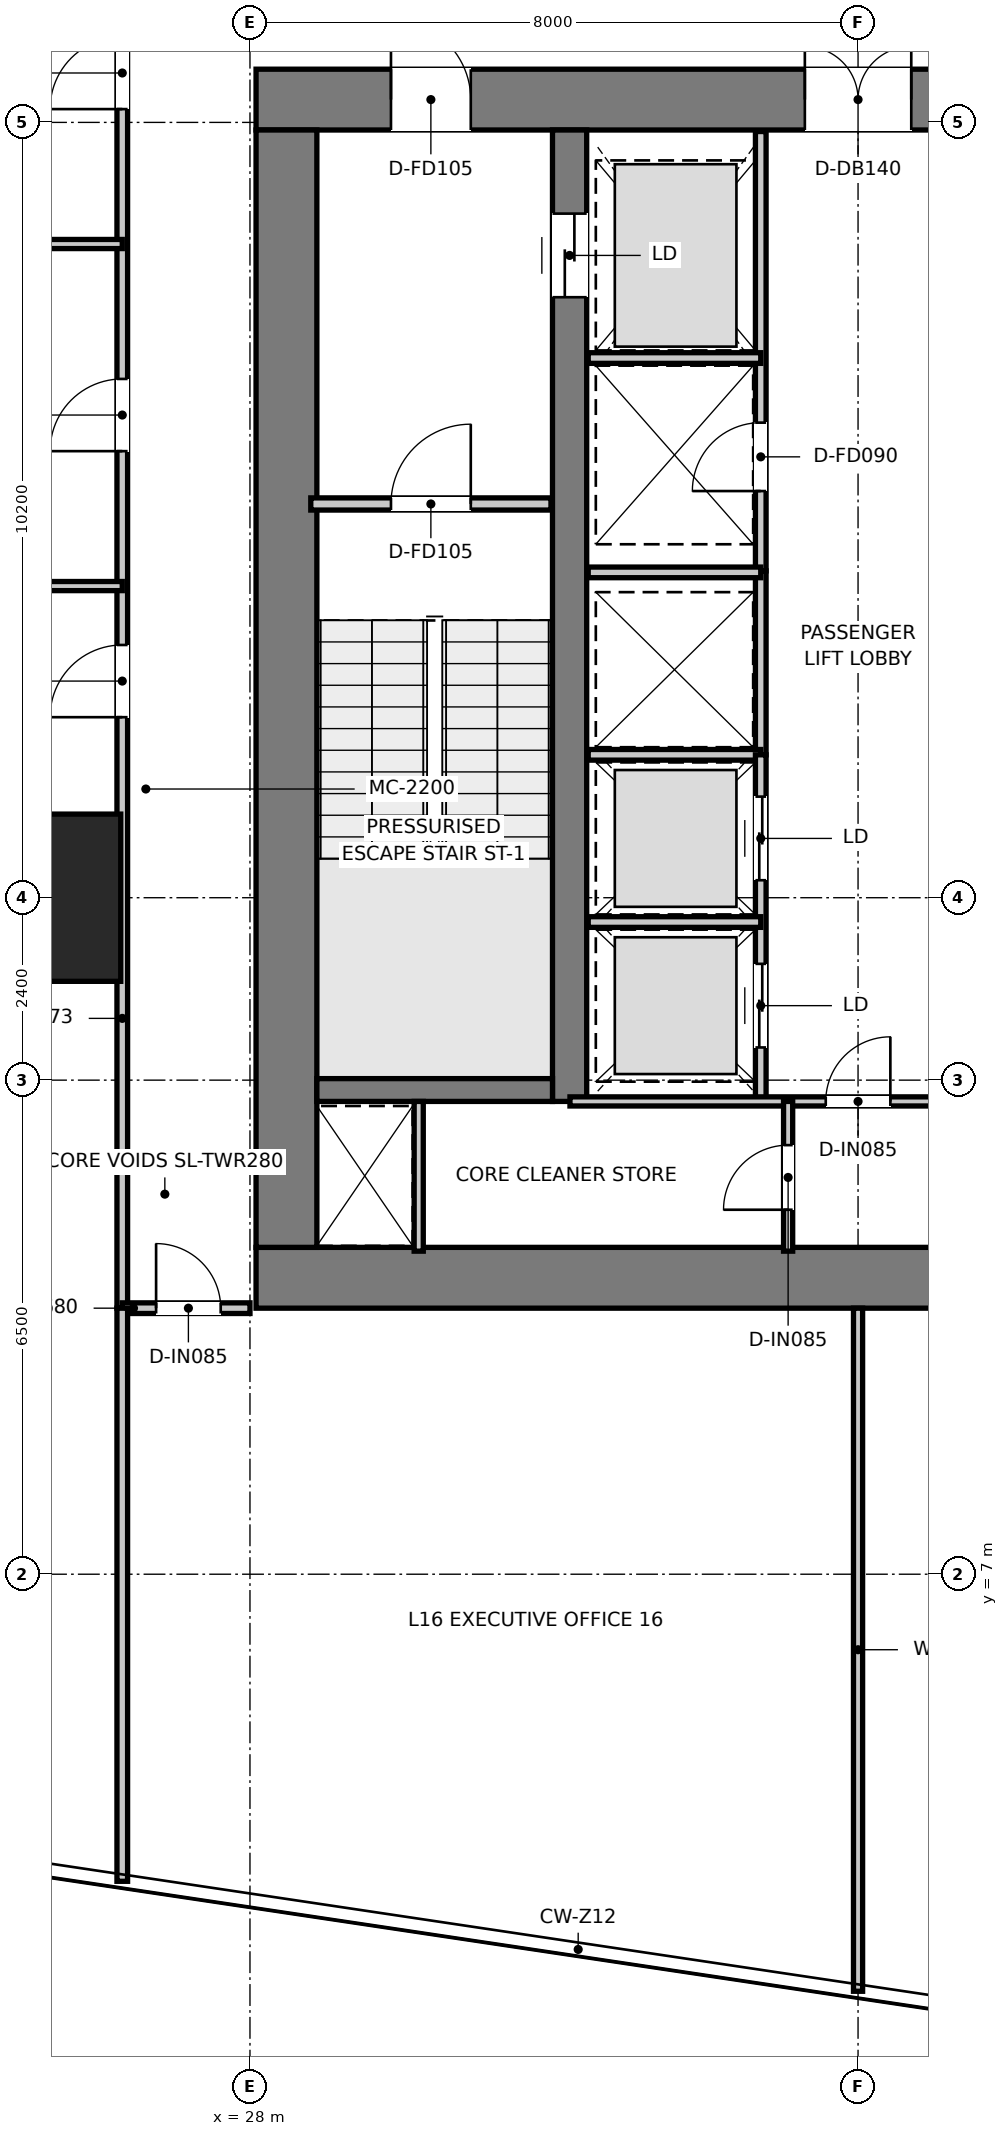
"""IFC4 building model, lengths in metres.
Left out: names, types, materials, properties, quantities, classifications, styles, units other than length and angle.
Written with IfcOpenShell. Run it as: python <this file> out.ifc"""

import sys

from ifc_helpers import new_model, si_unit, direction, frame, frame_2d, origin, origin_2d, place, context, subcontext, project, spatial, rectangle, extrude, source, transform, mapped, element, fill, save


model = new_model("IFC4")
c1 = context("Model", 3, precision=1e-05, world=origin(), true_north=direction((0.0, 1.0)))
c2 = subcontext(c1, "Body", "Model", "MODEL_VIEW")
j1 = project(units=[si_unit("LENGTHUNIT", "METRE"), si_unit("PLANEANGLEUNIT", "RADIAN")], contexts=[c1])
p1 = place(None, origin())
s1 = spatial("IfcSite", under=j1, at=p1, CompositionType="ELEMENT")
p2 = place(p1, origin())
s2 = spatial("IfcBuilding", under=s1, at=p2, CompositionType="ELEMENT")
p3 = place(p2, frame((0.0, 0.0, 68.45)))
s3 = spatial("IfcBuildingStorey", under=s2, at=p3, CompositionType="ELEMENT", Elevation=68.45)
p4 = place(p3, frame((28.08, 10.9, 0.0), z_axis=(0.0, 0.0, 1.0), x_axis=(1.0, 0.0, 0.0)))
e1 = element("IfcWall", 1, at=p4, inside=s3, PredefinedType="SHEAR", context=c2, shape_type="SweptSolid", body=[
    extrude(rectangle(XDim=15.84, YDim=0.8, at=frame_2d((7.92, 0.0))), origin(), (0.0, 0.0, 1.0), 3.95),
])
p5 = place(p3, frame((28.08, 26.4, 0.0), z_axis=(0.0, 0.0, 1.0), x_axis=(1.0, 0.0, 0.0)))
e2 = element("IfcWall", 2, at=p5, inside=s3, PredefinedType="SHEAR", context=c2, shape_type="SweptSolid", body=[
    extrude(rectangle(XDim=15.84, YDim=0.8, at=frame_2d((7.92, 0.0))), origin(), (0.0, 0.0, 1.0), 3.95),
])
p6 = place(p5, frame((7.22, 0.0, 0.0)))
e3 = element("IfcOpeningElement", 3, at=p6, cuts=e2, PredefinedType="OPENING", context=c2, shape_type="SweptSolid", body=[
    extrude(rectangle(XDim=1.4, YDim=2.2, at=frame_2d((0.7, 1.1))), frame((0.0, 0.41, 0.0), z_axis=(0.0, -1.0, 0.0), x_axis=(1.0, 0.0, 0.0)), (0.0, 0.0, 1.0), 0.82),
])
p7 = place(p5, frame((1.775, 0.0, 0.0)))
e4 = element("IfcOpeningElement", 4, at=p7, cuts=e2, PredefinedType="OPENING", context=c2, shape_type="SweptSolid", body=[
    extrude(rectangle(XDim=1.05, YDim=2.1, at=frame_2d((0.525, 1.05))), frame((0.0, 0.41, 0.0), z_axis=(0.0, -1.0, 0.0), x_axis=(1.0, 0.0, 0.0)), (0.0, 0.0, 1.0), 0.82),
])
p8 = place(p5, frame((13.015, 0.0, 0.0)))
e5 = element("IfcOpeningElement", 5, at=p8, cuts=e2, PredefinedType="OPENING", context=c2, shape_type="SweptSolid", body=[
    extrude(rectangle(XDim=1.05, YDim=2.1, at=frame_2d((0.525, 1.05))), frame((0.0, 0.41, 0.0), z_axis=(0.0, -1.0, 0.0), x_axis=(1.0, 0.0, 0.0)), (0.0, 0.0, 1.0), 0.82),
])
p9 = place(p3, frame((28.48, 11.3, 0.0), z_axis=(0.0, 0.0, 1.0), x_axis=(0.0, 1.0, 0.0)))
e6 = element("IfcWall", 6, at=p9, inside=s3, PredefinedType="SHEAR", context=c2, shape_type="SweptSolid", body=[
    extrude(rectangle(XDim=14.7, YDim=0.8, at=frame_2d((7.35, 0.0))), origin(), (0.0, 0.0, 1.0), 3.95),
])
p10 = place(p3, frame((32.205, 13.22, 0.0), z_axis=(0.0, 0.0, 1.0), x_axis=(0.0, 1.0, 0.0)))
e7 = element("IfcWall", 7, at=p10, inside=s3, PredefinedType="SHEAR", context=c2, shape_type="SweptSolid", body=[
    extrude(rectangle(XDim=12.78, YDim=0.45, at=frame_2d((6.39, 0.0))), origin(), (0.0, 0.0, 1.0), 3.95),
])
p11 = place(p10, frame((10.58, 0.0, 0.0)))
e8 = element("IfcOpeningElement", 8, at=p11, cuts=e7, PredefinedType="OPENING", context=c2, shape_type="SweptSolid", body=[
    extrude(rectangle(XDim=1.1, YDim=2.15, at=frame_2d((0.55, 1.075))), frame((0.0, 0.235, 0.0), z_axis=(0.0, -1.0, 0.0), x_axis=(1.0, 0.0, 0.0)), (0.0, 0.0, 1.0), 0.47),
])
p12 = place(p3, frame((28.88, 13.37, 0.0), z_axis=(0.0, 0.0, 1.0), x_axis=(1.0, 0.0, 0.0)))
e9 = element("IfcWall", 9, at=p12, inside=s3, PredefinedType="SHEAR", context=c2, shape_type="SweptSolid", body=[
    extrude(rectangle(XDim=3.1, YDim=0.3, at=frame_2d((1.55, 0.0))), origin(), (0.0, 0.0, 1.0), 3.95),
])
m1 = source(origin(), c2, "Body", "SweptSolid", [
    extrude(rectangle(XDim=2.2, YDim=2.2, at=origin_2d()), origin(), (0.0, 0.0, 1.0), 3.95),
])
p13 = place(p3, frame((25.2, 15.9, 0.0), z_axis=(0.0, 0.0, 1.0), x_axis=(1.0, 0.0, 0.0)))
e10 = element("IfcColumn", 10, at=p13, inside=s3, PredefinedType="USERDEFINED", context=c2, shape_type="MappedRepresentation", body=[
    mapped(m1, transform((0.0, 0.0, 0.0), x_axis=(1.0, 0.0, 0.0), y_axis=(0.0, 1.0, 0.0), z_axis=(0.0, 0.0, 1.0), scale=1.0)),
])
p14 = place(p3, frame((28.8, 21.08, 0.0), z_axis=(0.0, 0.0, 1.0), x_axis=(1.0, 0.0, 0.0)))
e11 = element("IfcWall", 11, at=p14, inside=s3, PredefinedType="PARTITIONING", context=c2, shape_type="SweptSolid", body=[
    extrude(rectangle(XDim=3.16, YDim=0.16, at=frame_2d((1.58, 0.0))), origin(), (0.0, 0.0, 1.0), 3.67),
])
p15 = place(p14, frame((1.055, 0.0, 0.0)))
e12 = element("IfcOpeningElement", 12, at=p15, cuts=e11, PredefinedType="OPENING", context=c2, shape_type="SweptSolid", body=[
    extrude(rectangle(XDim=1.05, YDim=2.1, at=frame_2d((0.525, 1.05))), frame((0.0, 0.09, 0.0), z_axis=(0.0, -1.0, 0.0), x_axis=(1.0, 0.0, 0.0)), (0.0, 0.0, 1.0), 0.18),
])
p16 = place(p3, frame((34.72, 20.2, 0.0), z_axis=(0.0, 0.0, 1.0), x_axis=(0.0, 1.0, 0.0)))
e13 = element("IfcWall", 13, at=p16, inside=s3, PredefinedType="PARTITIONING", context=c2, shape_type="SweptSolid", body=[
    extrude(rectangle(XDim=5.78, YDim=0.14, at=frame_2d((2.89, 0.0))), origin(), (0.0, 0.0, 1.0), 2.47),
])
p17 = place(p16, frame((1.05, 0.0, 0.0)))
e14 = element("IfcOpeningElement", 14, at=p17, cuts=e13, PredefinedType="OPENING", context=c2, shape_type="SweptSolid", body=[
    extrude(rectangle(XDim=0.9, YDim=2.1, at=frame_2d((0.45, 1.05))), frame((0.0, 0.08, 0.0), z_axis=(0.0, -1.0, 0.0), x_axis=(1.0, 0.0, 0.0)), (0.0, 0.0, 1.0), 0.16),
])
p18 = place(p3, frame((32.45, 23.0, 0.0), z_axis=(0.0, 0.0, 1.0), x_axis=(1.0, 0.0, 0.0)))
e15 = element("IfcWall", 15, at=p18, inside=s3, PredefinedType="PARTITIONING", context=c2, shape_type="SweptSolid", body=[
    extrude(rectangle(XDim=2.27, YDim=0.14, at=frame_2d((1.135, 0.0))), origin(), (0.0, 0.0, 1.0), 2.47),
])
p19 = place(p3, frame((34.72, 17.78, 0.0), z_axis=(0.0, 0.0, 1.0), x_axis=(0.0, 1.0, 0.0)))
e16 = element("IfcWall", 16, at=p19, inside=s3, PredefinedType="PARTITIONING", context=c2, shape_type="SweptSolid", body=[
    extrude(rectangle(XDim=2.42, YDim=0.14, at=frame_2d((1.21, 0.0))), origin(), (0.0, 0.0, 1.0), 3.67),
])
for number, where, z_axis, x_axis in (
    (17, (32.45, 17.78, 0.0), (0.0, 0.0, 1.0), (1.0, 0.0, 0.0)),
    (18, (32.45, 20.18, 0.0), (0.0, 0.0, 1.0), (1.0, 0.0, 0.0)),
):
    element("IfcWall", number, at=place(p3, frame(where, z_axis=z_axis, x_axis=x_axis)), inside=s3, PredefinedType="PARTITIONING", context=c2, shape_type="SweptSolid", body=[
        extrude(rectangle(XDim=2.27, YDim=0.14, at=frame_2d((1.135, 0.0))), origin(), (0.0, 0.0, 1.0), 3.67),
    ])
p20 = place(p3, frame((34.72, 13.22, 0.0), z_axis=(0.0, 0.0, 1.0), x_axis=(0.0, 1.0, 0.0)))
e19 = element("IfcWall", 19, at=p20, inside=s3, PredefinedType="PARTITIONING", context=c2, shape_type="SweptSolid", body=[
    extrude(rectangle(XDim=4.56, YDim=0.14, at=frame_2d((2.28, 0.0))), origin(), (0.0, 0.0, 1.0), 3.67),
])
p21 = place(p20, frame((0.71, 0.0, 0.0)))
e20 = element("IfcOpeningElement", 20, at=p21, cuts=e19, PredefinedType="OPENING", context=c2, shape_type="SweptSolid", body=[
    extrude(rectangle(XDim=1.1, YDim=2.15, at=frame_2d((0.55, 1.075))), frame((0.0, 0.08, 0.0), z_axis=(0.0, -1.0, 0.0), x_axis=(1.0, 0.0, 0.0)), (0.0, 0.0, 1.0), 0.16),
])
p22 = place(p20, frame((2.91, 0.0, 0.0)))
e21 = element("IfcOpeningElement", 21, at=p22, cuts=e19, PredefinedType="OPENING", context=c2, shape_type="SweptSolid", body=[
    extrude(rectangle(XDim=1.1, YDim=2.15, at=frame_2d((0.55, 1.075))), frame((0.0, 0.08, 0.0), z_axis=(0.0, -1.0, 0.0), x_axis=(1.0, 0.0, 0.0)), (0.0, 0.0, 1.0), 0.16),
])
p23 = place(p3, frame((32.45, 15.58, 0.0), z_axis=(0.0, 0.0, 1.0), x_axis=(1.0, 0.0, 0.0)))
e22 = element("IfcWall", 22, at=p23, inside=s3, PredefinedType="PARTITIONING", context=c2, shape_type="SweptSolid", body=[
    extrude(rectangle(XDim=2.27, YDim=0.14, at=frame_2d((1.135, 0.0))), origin(), (0.0, 0.0, 1.0), 3.67),
])
p24 = place(p3, frame((30.22, 11.25, 0.0), z_axis=(0.0, 0.0, 1.0), x_axis=(0.0, 1.0, 0.0)))
e23 = element("IfcWall", 23, at=p24, inside=s3, PredefinedType="PARTITIONING", context=c2, shape_type="SweptSolid", body=[
    extrude(rectangle(XDim=1.97, YDim=0.12, at=frame_2d((0.985, 0.0))), origin(), (0.0, 0.0, 1.0), 3.67),
])
p25 = place(p3, frame((32.21, 13.22, 0.0), z_axis=(0.0, 0.0, 1.0), x_axis=(1.0, 0.0, 0.0)))
e24 = element("IfcWall", 24, at=p25, inside=s3, PredefinedType="PARTITIONING", context=c2, shape_type="SweptSolid", body=[
    extrude(rectangle(XDim=7.58, YDim=0.12, at=frame_2d((3.79, 0.0))), origin(), (0.0, 0.0, 1.0), 3.67),
])
p26 = place(p25, frame((3.365, 0.0, 0.0)))
e25 = element("IfcOpeningElement", 25, at=p26, cuts=e24, PredefinedType="OPENING", context=c2, shape_type="SweptSolid", body=[
    extrude(rectangle(XDim=0.85, YDim=2.1, at=frame_2d((0.425, 1.05))), frame((0.0, 0.07, 0.0), z_axis=(0.0, -1.0, 0.0), x_axis=(1.0, 0.0, 0.0)), (0.0, 0.0, 1.0), 0.14),
])
p27 = place(p3, frame((35.08, 11.25, 0.0), z_axis=(0.0, 0.0, 1.0), x_axis=(0.0, 1.0, 0.0)))
e26 = element("IfcWall", 26, at=p27, inside=s3, PredefinedType="PARTITIONING", context=c2, shape_type="SweptSolid", body=[
    extrude(rectangle(XDim=1.97, YDim=0.12, at=frame_2d((0.985, 0.0))), origin(), (0.0, 0.0, 1.0), 3.67),
])
p28 = place(p27, frame((0.545, 0.0, 0.0)))
e27 = element("IfcOpeningElement", 27, at=p28, cuts=e26, PredefinedType="OPENING", context=c2, shape_type="SweptSolid", body=[
    extrude(rectangle(XDim=0.85, YDim=2.1, at=frame_2d((0.425, 1.05))), frame((0.0, 0.07, 0.0), z_axis=(0.0, -1.0, 0.0), x_axis=(1.0, 0.0, 0.0)), (0.0, 0.0, 1.0), 0.14),
])
p29 = place(p3, frame((26.32, 10.5, 0.0), z_axis=(0.0, 0.0, 1.0), x_axis=(0.0, 1.0, 0.0)))
e28 = element("IfcWall", 28, at=p29, inside=s3, PredefinedType="PARTITIONING", context=c2, shape_type="SweptSolid", body=[
    extrude(rectangle(XDim=25.62, YDim=0.14, at=frame_2d((12.81, 0.0))), origin(), (0.0, 0.0, 1.0), 2.97),
])
p30 = place(p29, frame((7.775, 0.0, 0.0)))
e29 = element("IfcOpeningElement", 29, at=p30, cuts=e28, PredefinedType="OPENING", context=c2, shape_type="SweptSolid", body=[
    extrude(rectangle(XDim=0.95, YDim=2.1, at=frame_2d((0.475, 1.05))), frame((0.0, 0.08, 0.0), z_axis=(0.0, -1.0, 0.0), x_axis=(1.0, 0.0, 0.0)), (0.0, 0.0, 1.0), 0.16),
])
p31 = place(p29, frame((11.275, 0.0, 0.0)))
e30 = element("IfcOpeningElement", 30, at=p31, cuts=e28, PredefinedType="OPENING", context=c2, shape_type="SweptSolid", body=[
    extrude(rectangle(XDim=0.95, YDim=2.1, at=frame_2d((0.475, 1.05))), frame((0.0, 0.08, 0.0), z_axis=(0.0, -1.0, 0.0), x_axis=(1.0, 0.0, 0.0)), (0.0, 0.0, 1.0), 0.16),
])
p32 = place(p29, frame((15.775, 0.0, 0.0)))
e31 = element("IfcOpeningElement", 31, at=p32, cuts=e28, PredefinedType="OPENING", context=c2, shape_type="SweptSolid", body=[
    extrude(rectangle(XDim=0.95, YDim=2.1, at=frame_2d((0.475, 1.05))), frame((0.0, 0.08, 0.0), z_axis=(0.0, -1.0, 0.0), x_axis=(1.0, 0.0, 0.0)), (0.0, 0.0, 1.0), 0.16),
])
p33 = place(p29, frame((20.125, 0.0, 0.0)))
e32 = element("IfcOpeningElement", 32, at=p33, cuts=e28, PredefinedType="OPENING", context=c2, shape_type="SweptSolid", body=[
    extrude(rectangle(XDim=0.95, YDim=2.1, at=frame_2d((0.475, 1.05))), frame((0.0, 0.08, 0.0), z_axis=(0.0, -1.0, 0.0), x_axis=(1.0, 0.0, 0.0)), (0.0, 0.0, 1.0), 0.16),
])
p34 = place(p29, frame((22.975, 0.0, 0.0)))
e33 = element("IfcOpeningElement", 33, at=p34, cuts=e28, PredefinedType="OPENING", context=c2, shape_type="SweptSolid", body=[
    extrude(rectangle(XDim=0.95, YDim=2.1, at=frame_2d((0.475, 1.05))), frame((0.0, 0.08, 0.0), z_axis=(0.0, -1.0, 0.0), x_axis=(1.0, 0.0, 0.0)), (0.0, 0.0, 1.0), 0.16),
])
p35 = place(p3, frame((26.32, 10.5, 0.0), z_axis=(0.0, 0.0, 1.0), x_axis=(1.0, 0.0, 0.0)))
e34 = element("IfcWall", 34, at=p35, inside=s3, PredefinedType="PARTITIONING", context=c2, shape_type="SweptSolid", body=[
    extrude(rectangle(XDim=1.68, YDim=0.14, at=frame_2d((0.84, 0.0))), origin(), (0.0, 0.0, 1.0), 3.67),
])
p36 = place(p35, frame((0.445, 0.0, 0.0)))
e35 = element("IfcOpeningElement", 35, at=p36, cuts=e34, PredefinedType="OPENING", context=c2, shape_type="SweptSolid", body=[
    extrude(rectangle(XDim=0.85, YDim=2.1, at=frame_2d((0.425, 1.05))), frame((0.0, 0.08, 0.0), z_axis=(0.0, -1.0, 0.0), x_axis=(1.0, 0.0, 0.0)), (0.0, 0.0, 1.0), 0.16),
])
p37 = place(p3, frame((26.32, 2.96, 0.0), z_axis=(0.0, 0.0, 1.0), x_axis=(0.0, 1.0, 0.0)))
e36 = element("IfcWall", 36, at=p37, inside=s3, PredefinedType="PARTITIONING", context=c2, shape_type="SweptSolid", body=[
    extrude(rectangle(XDim=7.54, YDim=0.14, at=frame_2d((3.77, 0.0))), origin(), (0.0, 0.0, 1.0), 3.67),
])
p38 = place(p3, frame((9.812, 20.0, 0.0), z_axis=(0.0, 0.0, 1.0), x_axis=(1.0, 0.0, 0.0)))
e37 = element("IfcWall", 37, at=p38, inside=s3, PredefinedType="PARTITIONING", context=c2, shape_type="SweptSolid", body=[
    extrude(rectangle(XDim=16.508, YDim=0.12, at=frame_2d((8.254, 0.0))), origin(), (0.0, 0.0, 1.0), 2.97),
])
p39 = place(p3, frame((10.485, 24.5, 0.0), z_axis=(0.0, 0.0, 1.0), x_axis=(1.0, 0.0, 0.0)))
e38 = element("IfcWall", 38, at=p39, inside=s3, PredefinedType="PARTITIONING", context=c2, shape_type="SweptSolid", body=[
    extrude(rectangle(XDim=15.835, YDim=0.12, at=frame_2d((7.918, 0.0))), origin(), (0.0, 0.0, 1.0), 2.97),
])
p40 = place(p3, frame((36.0, 1.513, 0.0), z_axis=(0.0, 0.0, 1.0), x_axis=(0.0, 1.0, 0.0)))
e39 = element("IfcWall", 39, at=p40, inside=s3, PredefinedType="PARTITIONING", context=c2, shape_type="SweptSolid", body=[
    extrude(rectangle(XDim=8.987, YDim=0.12, at=frame_2d((4.493, 0.0))), origin(), (0.0, 0.0, 1.0), 3.67),
])
p41 = place(p15, origin())
e40 = element("IfcDoor", 40, at=p41, inside=s3, OperationType="SINGLE_SWING_RIGHT", PredefinedType="DOOR", context=c2, shape_type="SweptSolid", body=[
    extrude(rectangle(XDim=1.05, YDim=2.1, at=frame_2d((0.525, 1.05))), frame((0.0, 0.025, 0.0), z_axis=(0.0, -1.0, 0.0), x_axis=(1.0, 0.0, 0.0)), (0.0, 0.0, 1.0), 0.05),
])
fill(e12, e40)
p42 = place(p6, origin())
e41 = element("IfcDoor", 41, at=p42, inside=s3, OperationType="DOUBLE_DOOR_SINGLE_SWING", PredefinedType="DOOR", context=c2, shape_type="SweptSolid", body=[
    extrude(rectangle(XDim=1.4, YDim=2.2, at=frame_2d((0.7, 1.1))), frame((0.0, 0.025, 0.0), z_axis=(0.0, -1.0, 0.0), x_axis=(1.0, 0.0, 0.0)), (0.0, 0.0, 1.0), 0.05),
])
fill(e3, e41)
p43 = place(p7, origin())
e42 = element("IfcDoor", 42, at=p43, inside=s3, OperationType="SINGLE_SWING_LEFT", PredefinedType="DOOR", context=c2, shape_type="SweptSolid", body=[
    extrude(rectangle(XDim=1.05, YDim=2.1, at=frame_2d((0.525, 1.05))), frame((0.0, 0.025, 0.0), z_axis=(0.0, -1.0, 0.0), x_axis=(1.0, 0.0, 0.0)), (0.0, 0.0, 1.0), 0.05),
])
fill(e4, e42)
p44 = place(p11, origin())
e43 = element("IfcDoor", 43, at=p44, inside=s3, OperationType="DOUBLE_DOOR_SLIDING", PredefinedType="DOOR", context=c2, shape_type="SweptSolid", body=[
    extrude(rectangle(XDim=1.1, YDim=2.15, at=frame_2d((0.55, 1.075))), frame((0.0, 0.025, 0.0), z_axis=(0.0, -1.0, 0.0), x_axis=(1.0, 0.0, 0.0)), (0.0, 0.0, 1.0), 0.05),
])
fill(e8, e43)
p45 = place(p17, origin())
e44 = element("IfcDoor", 44, at=p45, inside=s3, OperationType="SINGLE_SWING_LEFT", PredefinedType="DOOR", context=c2, shape_type="SweptSolid", body=[
    extrude(rectangle(XDim=0.9, YDim=2.1, at=frame_2d((0.45, 1.05))), frame((0.0, 0.025, 0.0), z_axis=(0.0, -1.0, 0.0), x_axis=(1.0, 0.0, 0.0)), (0.0, 0.0, 1.0), 0.05),
])
fill(e14, e44)
p46 = place(p21, origin())
e45 = element("IfcDoor", 45, at=p46, inside=s3, OperationType="DOUBLE_DOOR_SLIDING", PredefinedType="DOOR", context=c2, shape_type="SweptSolid", body=[
    extrude(rectangle(XDim=1.1, YDim=2.15, at=frame_2d((0.55, 1.075))), frame((0.0, 0.025, 0.0), z_axis=(0.0, -1.0, 0.0), x_axis=(1.0, 0.0, 0.0)), (0.0, 0.0, 1.0), 0.05),
])
fill(e20, e45)
p47 = place(p22, origin())
e46 = element("IfcDoor", 46, at=p47, inside=s3, OperationType="DOUBLE_DOOR_SLIDING", PredefinedType="DOOR", context=c2, shape_type="SweptSolid", body=[
    extrude(rectangle(XDim=1.1, YDim=2.15, at=frame_2d((0.55, 1.075))), frame((0.0, 0.025, 0.0), z_axis=(0.0, -1.0, 0.0), x_axis=(1.0, 0.0, 0.0)), (0.0, 0.0, 1.0), 0.05),
])
fill(e21, e46)
p48 = place(p26, origin())
e47 = element("IfcDoor", 47, at=p48, inside=s3, OperationType="SINGLE_SWING_RIGHT", PredefinedType="DOOR", context=c2, shape_type="SweptSolid", body=[
    extrude(rectangle(XDim=0.85, YDim=2.1, at=frame_2d((0.425, 1.05))), frame((0.0, 0.025, 0.0), z_axis=(0.0, -1.0, 0.0), x_axis=(1.0, 0.0, 0.0)), (0.0, 0.0, 1.0), 0.05),
])
fill(e25, e47)
p49 = place(p28, origin())
e48 = element("IfcDoor", 48, at=p49, inside=s3, OperationType="SINGLE_SWING_LEFT", PredefinedType="DOOR", context=c2, shape_type="SweptSolid", body=[
    extrude(rectangle(XDim=0.85, YDim=2.1, at=frame_2d((0.425, 1.05))), frame((0.0, 0.025, 0.0), z_axis=(0.0, -1.0, 0.0), x_axis=(1.0, 0.0, 0.0)), (0.0, 0.0, 1.0), 0.05),
])
fill(e27, e48)
p50 = place(p30, origin())
e49 = element("IfcDoor", 49, at=p50, inside=s3, OperationType="SINGLE_SWING_LEFT", PredefinedType="DOOR", context=c2, shape_type="SweptSolid", body=[
    extrude(rectangle(XDim=0.95, YDim=2.1, at=frame_2d((0.475, 1.05))), frame((0.0, 0.025, 0.0), z_axis=(0.0, -1.0, 0.0), x_axis=(1.0, 0.0, 0.0)), (0.0, 0.0, 1.0), 0.05),
])
fill(e29, e49)
p51 = place(p31, origin())
e50 = element("IfcDoor", 50, at=p51, inside=s3, OperationType="SINGLE_SWING_LEFT", PredefinedType="DOOR", context=c2, shape_type="SweptSolid", body=[
    extrude(rectangle(XDim=0.95, YDim=2.1, at=frame_2d((0.475, 1.05))), frame((0.0, 0.025, 0.0), z_axis=(0.0, -1.0, 0.0), x_axis=(1.0, 0.0, 0.0)), (0.0, 0.0, 1.0), 0.05),
])
fill(e30, e50)
p52 = place(p32, origin())
e51 = element("IfcDoor", 51, at=p52, inside=s3, OperationType="SINGLE_SWING_LEFT", PredefinedType="DOOR", context=c2, shape_type="SweptSolid", body=[
    extrude(rectangle(XDim=0.95, YDim=2.1, at=frame_2d((0.475, 1.05))), frame((0.0, 0.025, 0.0), z_axis=(0.0, -1.0, 0.0), x_axis=(1.0, 0.0, 0.0)), (0.0, 0.0, 1.0), 0.05),
])
fill(e31, e51)
p53 = place(p36, origin())
e52 = element("IfcDoor", 52, at=p53, inside=s3, OperationType="SINGLE_SWING_LEFT", PredefinedType="DOOR", context=c2, shape_type="SweptSolid", body=[
    extrude(rectangle(XDim=0.85, YDim=2.1, at=frame_2d((0.425, 1.05))), frame((0.0, 0.025, 0.0), z_axis=(0.0, -1.0, 0.0), x_axis=(1.0, 0.0, 0.0)), (0.0, 0.0, 1.0), 0.05),
])
fill(e35, e52)
save(model, sys.argv[1])
